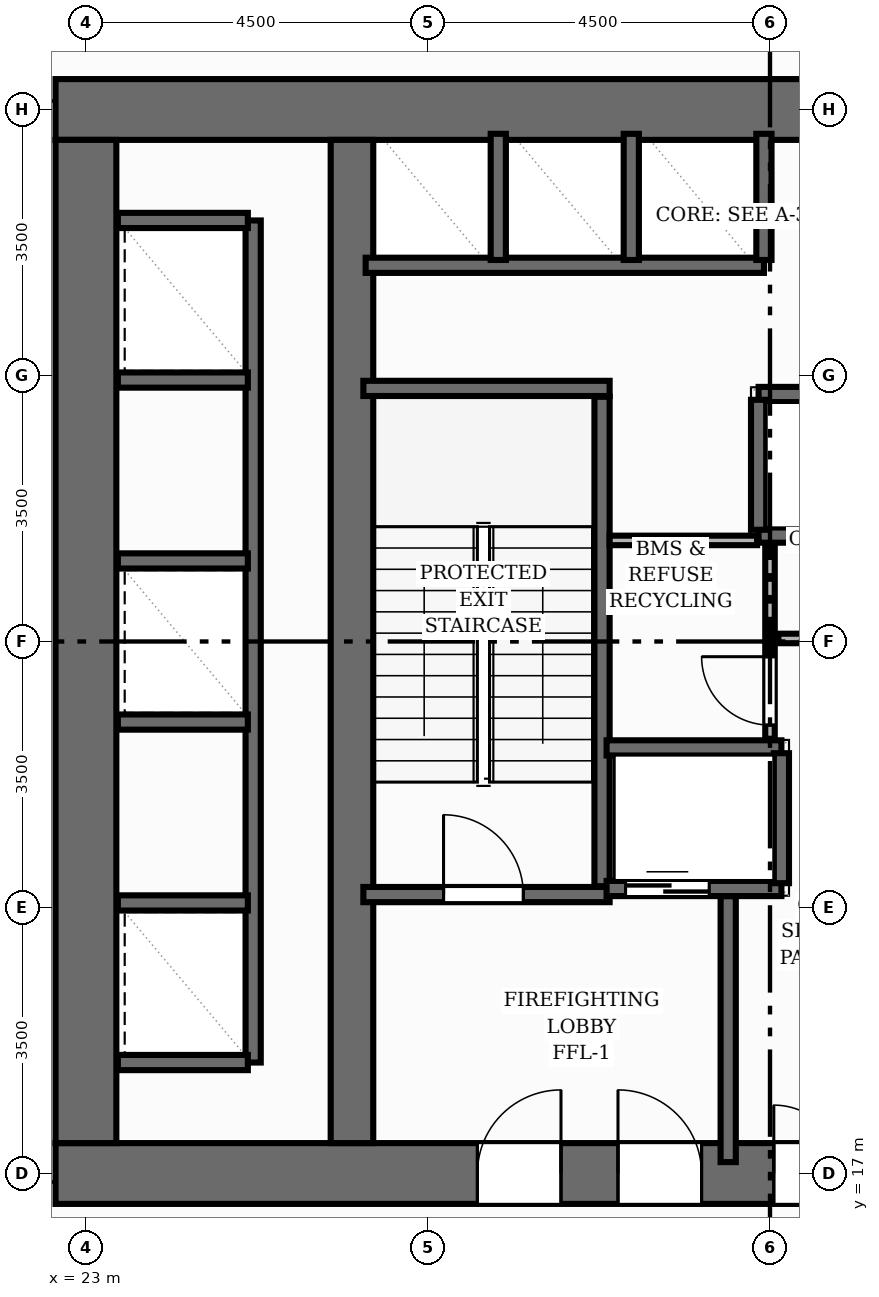
"""IFC4 building model, lengths in metres.
Left out: names, types, materials, properties, quantities, classifications, styles, units other than length and angle.
Written with IfcOpenShell. Run it as: python <this file> out.ifc"""

import sys

from ifc_helpers import new_model, si_unit, direction, frame, frame_2d, origin, place, context, subcontext, project, spatial, rectangle, extrude, element, fill, save


model = new_model("IFC4")
c1 = context("Model", 3, precision=1e-05, world=origin(), true_north=direction((0.0, 1.0)))
c2 = subcontext(c1, "Body", "Model", "MODEL_VIEW")
j1 = project(units=[si_unit("LENGTHUNIT", "METRE"), si_unit("PLANEANGLEUNIT", "RADIAN")], contexts=[c1])
p1 = place(None, origin())
s1 = spatial("IfcSite", under=j1, at=p1, CompositionType="ELEMENT")
p2 = place(p1, origin())
s2 = spatial("IfcBuilding", under=s1, at=p2, CompositionType="ELEMENT")
p3 = place(p2, frame((0.0, 0.0, 66.4)))
s3 = spatial("IfcBuildingStorey", under=s2, at=p3, CompositionType="ELEMENT", Elevation=66.4)
p4 = place(p3, frame((22.6, 17.0, 0.0), z_axis=(0.0, 0.0, 1.0), x_axis=(1.0, 0.0, 0.0)))
e1 = element("IfcWall", 1, at=p4, inside=s3, PredefinedType="SHEAR", context=c2, shape_type="SweptSolid", body=[
    extrude(rectangle(XDim=18.8, YDim=0.8, at=frame_2d((9.4, 0.0))), origin(), (0.0, 0.0, 1.0), 4.48),
])
p5 = place(p4, frame((5.55, 0.0, 0.0)))
e2 = element("IfcOpeningElement", 2, at=p5, cuts=e1, PredefinedType="OPENING", context=c2, shape_type="SweptSolid", body=[
    extrude(rectangle(XDim=1.1, YDim=2.15, at=frame_2d((0.55, 1.075))), frame((0.0, 0.41, 0.0), z_axis=(0.0, -1.0, 0.0), x_axis=(1.0, 0.0, 0.0)), (0.0, 0.0, 1.0), 0.82),
])
p6 = place(p4, frame((7.4, 0.0, 0.0)))
e3 = element("IfcOpeningElement", 3, at=p6, cuts=e1, PredefinedType="OPENING", context=c2, shape_type="SweptSolid", body=[
    extrude(rectangle(XDim=1.1, YDim=2.15, at=frame_2d((0.55, 1.075))), frame((0.0, 0.41, 0.0), z_axis=(0.0, -1.0, 0.0), x_axis=(1.0, 0.0, 0.0)), (0.0, 0.0, 1.0), 0.82),
])
p7 = place(p4, frame((9.45, 0.0, 0.0)))
e4 = element("IfcOpeningElement", 4, at=p7, cuts=e1, PredefinedType="OPENING", context=c2, shape_type="SweptSolid", body=[
    extrude(rectangle(XDim=0.9, YDim=2.1, at=frame_2d((0.45, 1.05))), frame((0.0, 0.41, 0.0), z_axis=(0.0, -1.0, 0.0), x_axis=(1.0, 0.0, 0.0)), (0.0, 0.0, 1.0), 0.82),
])
p8 = place(p3, frame((22.6, 31.0, 0.0), z_axis=(0.0, 0.0, 1.0), x_axis=(1.0, 0.0, 0.0)))
e5 = element("IfcWall", 5, at=p8, inside=s3, PredefinedType="SHEAR", context=c2, shape_type="SweptSolid", body=[
    extrude(rectangle(XDim=18.8, YDim=0.8, at=frame_2d((9.4, 0.0))), origin(), (0.0, 0.0, 1.0), 4.48),
])
p9 = place(p8, frame((10.3, 0.0, 0.0)))
e6 = element("IfcOpeningElement", 6, at=p9, cuts=e5, PredefinedType="OPENING", context=c2, shape_type="SweptSolid", body=[
    extrude(rectangle(XDim=1.1, YDim=2.15, at=frame_2d((0.55, 1.075))), frame((0.0, 0.41, 0.0), z_axis=(0.0, -1.0, 0.0), x_axis=(1.0, 0.0, 0.0)), (0.0, 0.0, 1.0), 0.82),
])
p10 = place(p8, frame((12.15, 0.0, 0.0)))
e7 = element("IfcOpeningElement", 7, at=p10, cuts=e5, PredefinedType="OPENING", context=c2, shape_type="SweptSolid", body=[
    extrude(rectangle(XDim=1.1, YDim=2.15, at=frame_2d((0.55, 1.075))), frame((0.0, 0.41, 0.0), z_axis=(0.0, -1.0, 0.0), x_axis=(1.0, 0.0, 0.0)), (0.0, 0.0, 1.0), 0.82),
])
p11 = place(p3, frame((23.0, 17.4, 0.0), z_axis=(0.0, 0.0, 1.0), x_axis=(0.0, 1.0, 0.0)))
e8 = element("IfcWall", 8, at=p11, inside=s3, PredefinedType="SHEAR", context=c2, shape_type="SweptSolid", body=[
    extrude(rectangle(XDim=13.2, YDim=0.8, at=frame_2d((6.6, 0.0))), origin(), (0.0, 0.0, 1.0), 4.48),
])
p12 = place(p3, frame((26.5, 17.4, 0.0), z_axis=(0.0, 0.0, 1.0), x_axis=(0.0, 1.0, 0.0)))
e9 = element("IfcWall", 9, at=p12, inside=s3, PredefinedType="SHEAR", context=c2, shape_type="SweptSolid", body=[
    extrude(rectangle(XDim=13.2, YDim=0.56, at=frame_2d((6.6, 0.0))), origin(), (0.0, 0.0, 1.0), 4.48),
])
p13 = place(p3, frame((29.79, 20.78, 0.0), z_axis=(0.0, 0.0, 1.0), x_axis=(0.0, 1.0, 0.0)))
e10 = element("IfcWall", 10, at=p13, inside=s3, PredefinedType="SHEAR", context=c2, shape_type="SweptSolid", body=[
    extrude(rectangle(XDim=6.44, YDim=0.2, at=frame_2d((3.22, 0.0))), origin(), (0.0, 0.0, 1.0), 4.48),
])
p14 = place(p3, frame((26.65, 27.33, 0.0), z_axis=(0.0, 0.0, 1.0), x_axis=(1.0, 0.0, 0.0)))
e11 = element("IfcWall", 11, at=p14, inside=s3, PredefinedType="SHEAR", context=c2, shape_type="SweptSolid", body=[
    extrude(rectangle(XDim=3.24, YDim=0.2, at=frame_2d((1.62, 0.0))), origin(), (0.0, 0.0, 1.0), 4.48),
])
p15 = place(p3, frame((26.65, 20.67, 0.0), z_axis=(0.0, 0.0, 1.0), x_axis=(1.0, 0.0, 0.0)))
e12 = element("IfcWall", 12, at=p15, inside=s3, PredefinedType="SHEAR", context=c2, shape_type="SweptSolid", body=[
    extrude(rectangle(XDim=3.24, YDim=0.2, at=frame_2d((1.62, 0.0))), origin(), (0.0, 0.0, 1.0), 4.48),
])
p16 = place(p15, frame((1.055, 0.0, 0.0)))
e13 = element("IfcOpeningElement", 13, at=p16, cuts=e12, PredefinedType="OPENING", context=c2, shape_type="SweptSolid", body=[
    extrude(rectangle(XDim=1.05, YDim=2.15, at=frame_2d((0.525, 1.075))), frame((0.0, 0.11, 0.0), z_axis=(0.0, -1.0, 0.0), x_axis=(1.0, 0.0, 0.0)), (0.0, 0.0, 1.0), 0.22),
])
p17 = place(p3, frame((31.45, 17.15, 0.0), z_axis=(0.0, 0.0, 1.0), x_axis=(0.0, 1.0, 0.0)))
e14 = element("IfcWall", 14, at=p17, inside=s3, PredefinedType="SHEAR", context=c2, shape_type="SweptSolid", body=[
    extrude(rectangle(XDim=3.5, YDim=0.2, at=frame_2d((1.75, 0.0))), origin(), (0.0, 0.0, 1.0), 4.48),
])
p18 = place(p3, frame((29.85, 20.75, 0.0), z_axis=(0.0, 0.0, 1.0), x_axis=(1.0, 0.0, 0.0)))
e15 = element("IfcWall", 15, at=p18, inside=s3, PredefinedType="SHEAR", context=c2, shape_type="SweptSolid", body=[
    extrude(rectangle(XDim=2.3, YDim=0.2, at=frame_2d((1.15, 0.0))), origin(), (0.0, 0.0, 1.0), 4.48),
])
p19 = place(p18, frame((0.25, 0.0, 0.0)))
e16 = element("IfcOpeningElement", 16, at=p19, cuts=e15, PredefinedType="OPENING", context=c2, shape_type="SweptSolid", body=[
    extrude(rectangle(XDim=1.1, YDim=2.15, at=frame_2d((0.55, 1.075))), frame((0.0, 0.11, 0.0), z_axis=(0.0, -1.0, 0.0), x_axis=(1.0, 0.0, 0.0)), (0.0, 0.0, 1.0), 0.22),
])
p20 = place(p3, frame((29.85, 22.6, 0.0), z_axis=(0.0, 0.0, 1.0), x_axis=(1.0, 0.0, 0.0)))
e17 = element("IfcWall", 17, at=p20, inside=s3, PredefinedType="SHEAR", context=c2, shape_type="SweptSolid", body=[
    extrude(rectangle(XDim=2.3, YDim=0.2, at=frame_2d((1.15, 0.0))), origin(), (0.0, 0.0, 1.0), 4.48),
])
p21 = place(p3, frame((32.15, 20.82, 0.0), z_axis=(0.0, 0.0, 1.0), x_axis=(0.0, 1.0, 0.0)))
e18 = element("IfcWall", 18, at=p21, inside=s3, PredefinedType="SHEAR", context=c2, shape_type="SweptSolid", body=[
    extrude(rectangle(XDim=1.71, YDim=0.2, at=frame_2d((0.855, 0.0))), origin(), (0.0, 0.0, 1.0), 4.48),
])
p22 = place(p3, frame((31.85, 27.25, 0.0), z_axis=(0.0, 0.0, 1.0), x_axis=(1.0, 0.0, 0.0)))
e19 = element("IfcWall", 19, at=p22, inside=s3, PredefinedType="SHEAR", context=c2, shape_type="SweptSolid", body=[
    extrude(rectangle(XDim=2.3, YDim=0.2, at=frame_2d((1.15, 0.0))), origin(), (0.0, 0.0, 1.0), 4.48),
])
p23 = place(p22, frame((0.95, 0.0, 0.0)))
e20 = element("IfcOpeningElement", 20, at=p23, cuts=e19, PredefinedType="OPENING", context=c2, shape_type="SweptSolid", body=[
    extrude(rectangle(XDim=1.1, YDim=2.15, at=frame_2d((0.55, 1.075))), frame((0.0, 0.11, 0.0), z_axis=(0.0, -1.0, 0.0), x_axis=(1.0, 0.0, 0.0)), (0.0, 0.0, 1.0), 0.22),
])
p24 = place(p3, frame((31.85, 25.4, 0.0), z_axis=(0.0, 0.0, 1.0), x_axis=(1.0, 0.0, 0.0)))
e21 = element("IfcWall", 21, at=p24, inside=s3, PredefinedType="SHEAR", context=c2, shape_type="SweptSolid", body=[
    extrude(rectangle(XDim=2.3, YDim=0.2, at=frame_2d((1.15, 0.0))), origin(), (0.0, 0.0, 1.0), 4.48),
])
p25 = place(p3, frame((31.85, 25.47, 0.0), z_axis=(0.0, 0.0, 1.0), x_axis=(0.0, 1.0, 0.0)))
e22 = element("IfcWall", 22, at=p25, inside=s3, PredefinedType="SHEAR", context=c2, shape_type="SweptSolid", body=[
    extrude(rectangle(XDim=1.71, YDim=0.2, at=frame_2d((0.855, 0.0))), origin(), (0.0, 0.0, 1.0), 4.48),
])
p26 = place(p3, frame((25.2, 18.46, 0.0), z_axis=(0.0, 0.0, 1.0), x_axis=(0.0, 1.0, 0.0)))
e23 = element("IfcWall", 23, at=p26, inside=s3, PredefinedType="SHEAR", context=c2, shape_type="SweptSolid", body=[
    extrude(rectangle(XDim=11.08, YDim=0.2, at=frame_2d((5.54, 0.0))), origin(), (0.0, 0.0, 1.0), 4.48),
])
for number, where, z_axis, x_axis in (
    (24, (23.42, 18.46, 0.0), (0.0, 0.0, 1.0), (1.0, 0.0, 0.0)),
    (25, (23.42, 29.54, 0.0), (0.0, 0.0, 1.0), (1.0, 0.0, 0.0)),
    (26, (23.42, 20.56, 0.0), (0.0, 0.0, 1.0), (1.0, 0.0, 0.0)),
    (27, (23.42, 22.94, 0.0), (0.0, 0.0, 1.0), (1.0, 0.0, 0.0)),
    (28, (23.42, 25.06, 0.0), (0.0, 0.0, 1.0), (1.0, 0.0, 0.0)),
    (29, (23.42, 27.44, 0.0), (0.0, 0.0, 1.0), (1.0, 0.0, 0.0)),
):
    element("IfcWall", number, at=place(p3, frame(where, z_axis=z_axis, x_axis=x_axis)), inside=s3, PredefinedType="SHEAR", context=c2, shape_type="SweptSolid", body=[
        extrude(rectangle(XDim=1.71, YDim=0.2, at=frame_2d((0.855, 0.0))), origin(), (0.0, 0.0, 1.0), 4.48),
    ])
p27 = place(p3, frame((26.68, 28.95, 0.0), z_axis=(0.0, 0.0, 1.0), x_axis=(1.0, 0.0, 0.0)))
e30 = element("IfcWall", 30, at=p27, inside=s3, PredefinedType="SHEAR", context=c2, shape_type="SweptSolid", body=[
    extrude(rectangle(XDim=5.24, YDim=0.2, at=frame_2d((2.62, 0.0))), origin(), (0.0, 0.0, 1.0), 4.48),
])
for number, where, z_axis, x_axis in (
    (31, (31.92, 29.02, 0.0), (0.0, 0.0, 1.0), (0.0, 1.0, 0.0)),
    (32, (28.425, 29.02, 0.0), (0.0, 0.0, 1.0), (0.0, 1.0, 0.0)),
    (33, (30.175, 29.02, 0.0), (0.0, 0.0, 1.0), (0.0, 1.0, 0.0)),
):
    element("IfcWall", number, at=place(p3, frame(where, z_axis=z_axis, x_axis=x_axis)), inside=s3, PredefinedType="SHEAR", context=c2, shape_type="SweptSolid", body=[
        extrude(rectangle(XDim=1.66, YDim=0.2, at=frame_2d((0.83, 0.0))), origin(), (0.0, 0.0, 1.0), 4.48),
    ])
p28 = place(p3, frame((32.0, 22.72, 0.0), z_axis=(0.0, 0.0, 1.0), x_axis=(0.0, 1.0, 0.0)))
e34 = element("IfcWall", 34, at=p28, inside=s3, PredefinedType="PARTITIONING", context=c2, shape_type="SweptSolid", body=[
    extrude(rectangle(XDim=2.52, YDim=0.125, at=frame_2d((1.26, 0.0))), origin(), (0.0, 0.0, 1.0), 4.235),
])
p29 = place(p28, frame((0.18, 0.0, 0.0)))
e35 = element("IfcOpeningElement", 35, at=p29, cuts=e34, PredefinedType="OPENING", context=c2, shape_type="SweptSolid", body=[
    extrude(rectangle(XDim=0.9, YDim=2.1, at=frame_2d((0.45, 1.05))), frame((0.0, 0.073, 0.0), z_axis=(0.0, -1.0, 0.0), x_axis=(1.0, 0.0, 0.0)), (0.0, 0.0, 1.0), 0.145),
])
p30 = place(p3, frame((32.11, 24.04, 0.0), z_axis=(0.0, 0.0, 1.0), x_axis=(1.0, 0.0, 0.0)))
e36 = element("IfcWall", 36, at=p30, inside=s3, PredefinedType="PARTITIONING", context=c2, shape_type="SweptSolid", body=[
    extrude(rectangle(XDim=1.97, YDim=0.125, at=frame_2d((0.985, 0.0))), origin(), (0.0, 0.0, 1.0), 4.235),
])
p31 = place(p30, frame((0.39, 0.0, 0.0)))
e37 = element("IfcOpeningElement", 37, at=p31, cuts=e36, PredefinedType="OPENING", context=c2, shape_type="SweptSolid", body=[
    extrude(rectangle(XDim=0.9, YDim=2.1, at=frame_2d((0.45, 1.05))), frame((0.0, 0.073, 0.0), z_axis=(0.0, -1.0, 0.0), x_axis=(1.0, 0.0, 0.0)), (0.0, 0.0, 1.0), 0.145),
])
p32 = place(p3, frame((29.89, 25.33, 0.0), z_axis=(0.0, 0.0, 1.0), x_axis=(1.0, 0.0, 0.0)))
e38 = element("IfcWall", 38, at=p32, inside=s3, PredefinedType="PARTITIONING", context=c2, shape_type="SweptSolid", body=[
    extrude(rectangle(XDim=1.94, YDim=0.125, at=frame_2d((0.97, 0.0))), origin(), (0.0, 0.0, 1.0), 4.235),
])
p33 = place(p16, origin())
e39 = element("IfcDoor", 39, at=p33, inside=s3, OperationType="SINGLE_SWING_LEFT", PredefinedType="DOOR", context=c2, shape_type="SweptSolid", body=[
    extrude(rectangle(XDim=1.05, YDim=2.15, at=frame_2d((0.525, 1.075))), frame((0.0, 0.025, 0.0), z_axis=(0.0, -1.0, 0.0), x_axis=(1.0, 0.0, 0.0)), (0.0, 0.0, 1.0), 0.05),
])
fill(e13, e39)
p34 = place(p5, origin())
e40 = element("IfcDoor", 40, at=p34, inside=s3, OperationType="SINGLE_SWING_RIGHT", PredefinedType="DOOR", context=c2, shape_type="SweptSolid", body=[
    extrude(rectangle(XDim=1.1, YDim=2.15, at=frame_2d((0.55, 1.075))), frame((0.0, 0.025, 0.0), z_axis=(0.0, -1.0, 0.0), x_axis=(1.0, 0.0, 0.0)), (0.0, 0.0, 1.0), 0.05),
])
fill(e2, e40)
p35 = place(p6, origin())
e41 = element("IfcDoor", 41, at=p35, inside=s3, OperationType="SINGLE_SWING_LEFT", PredefinedType="DOOR", context=c2, shape_type="SweptSolid", body=[
    extrude(rectangle(XDim=1.1, YDim=2.15, at=frame_2d((0.55, 1.075))), frame((0.0, 0.025, 0.0), z_axis=(0.0, -1.0, 0.0), x_axis=(1.0, 0.0, 0.0)), (0.0, 0.0, 1.0), 0.05),
])
fill(e3, e41)
p36 = place(p19, origin())
e42 = element("IfcDoor", 42, at=p36, inside=s3, OperationType="DOUBLE_DOOR_SLIDING", PredefinedType="DOOR", context=c2, shape_type="SweptSolid", body=[
    extrude(rectangle(XDim=1.1, YDim=2.15, at=frame_2d((0.55, 1.075))), frame((0.0, 0.025, 0.0), z_axis=(0.0, -1.0, 0.0), x_axis=(1.0, 0.0, 0.0)), (0.0, 0.0, 1.0), 0.05),
])
fill(e16, e42)
p37 = place(p7, origin())
e43 = element("IfcDoor", 43, at=p37, inside=s3, OperationType="SINGLE_SWING_LEFT", PredefinedType="DOOR", context=c2, shape_type="SweptSolid", body=[
    extrude(rectangle(XDim=0.9, YDim=2.1, at=frame_2d((0.45, 1.05))), frame((0.0, 0.025, 0.0), z_axis=(0.0, -1.0, 0.0), x_axis=(1.0, 0.0, 0.0)), (0.0, 0.0, 1.0), 0.05),
])
fill(e4, e43)
p38 = place(p29, origin())
e44 = element("IfcDoor", 44, at=p38, inside=s3, OperationType="SINGLE_SWING_RIGHT", PredefinedType="DOOR", context=c2, shape_type="SweptSolid", body=[
    extrude(rectangle(XDim=0.9, YDim=2.1, at=frame_2d((0.45, 1.05))), frame((0.0, 0.025, 0.0), z_axis=(0.0, -1.0, 0.0), x_axis=(1.0, 0.0, 0.0)), (0.0, 0.0, 1.0), 0.05),
])
fill(e35, e44)
save(model, sys.argv[1])
